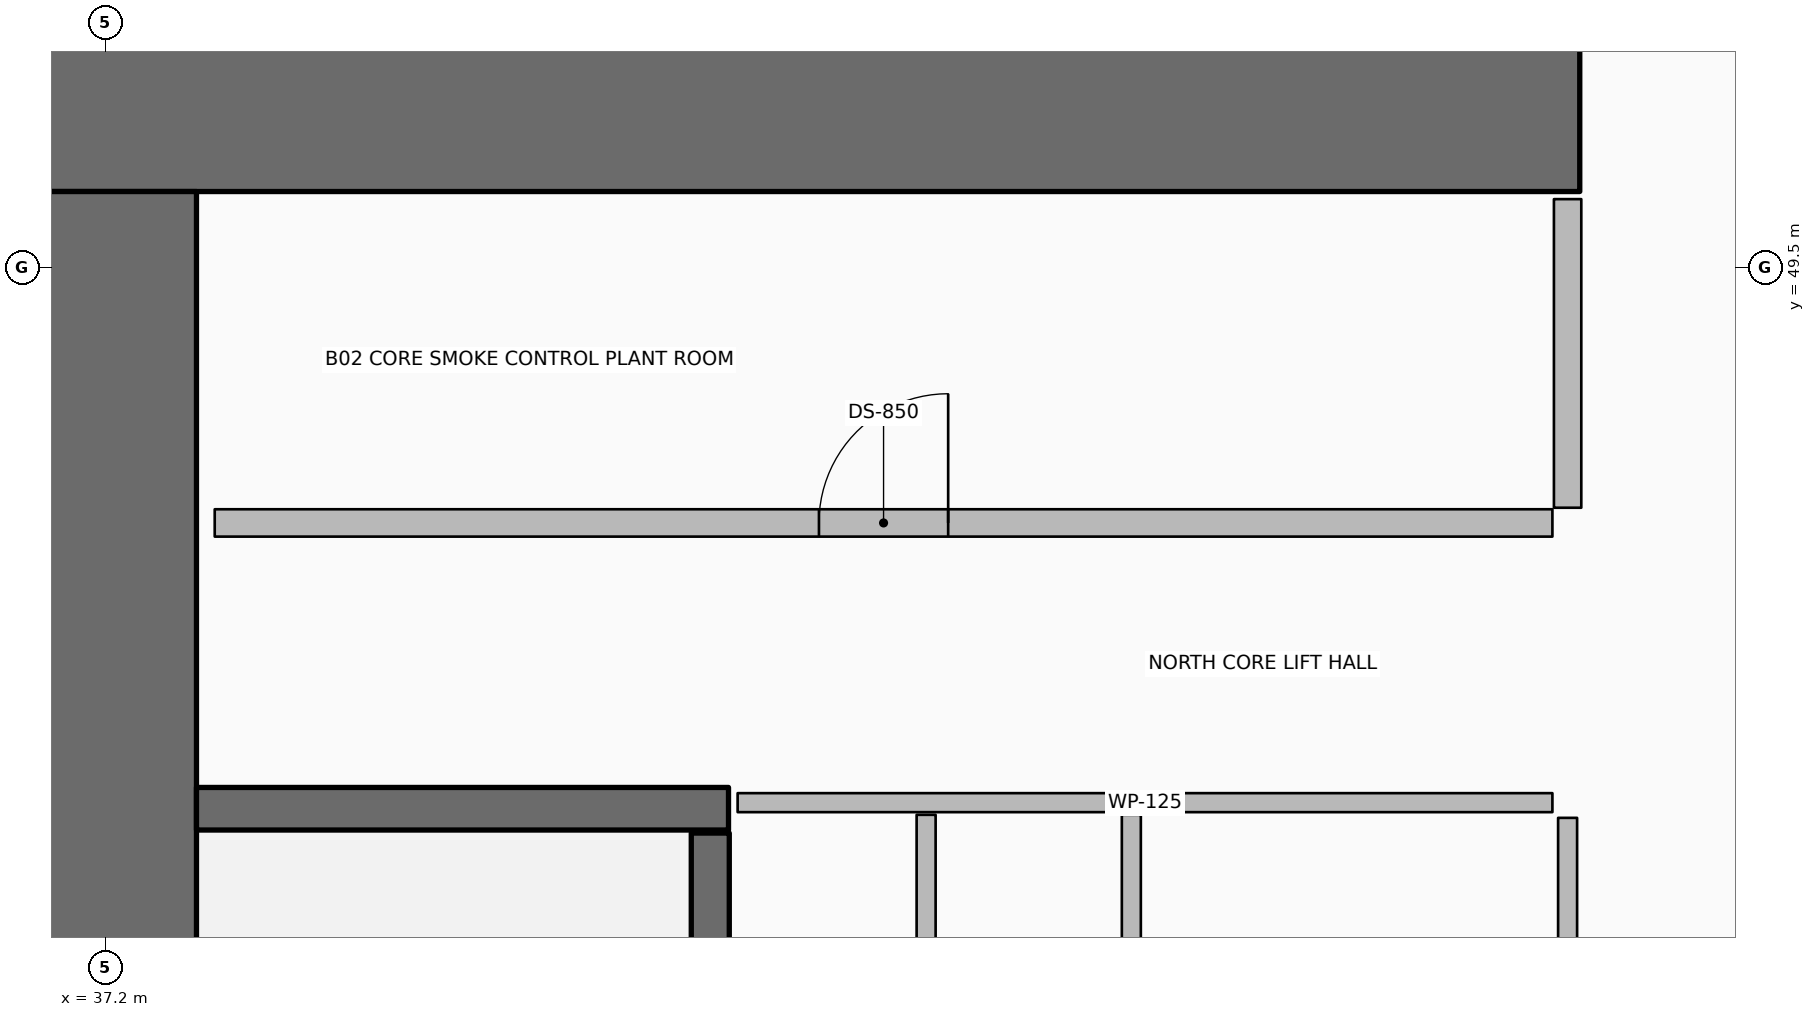
"""IFC4 building model, lengths in metres.
Left out: names, types, materials, properties, quantities, classifications, styles, units other than length and angle.
Written with IfcOpenShell. Run it as: python <this file> out.ifc"""

import sys

from ifc_helpers import new_model, si_unit, direction, frame, frame_2d, origin, place, context, subcontext, project, spatial, rectangle, extrude, element, fill, save


model = new_model("IFC4")
c1 = context("Model", 3, precision=1e-05, world=origin(), true_north=direction((0.0, 1.0)))
c2 = subcontext(c1, "Body", "Model", "MODEL_VIEW")
j1 = project(units=[si_unit("LENGTHUNIT", "METRE"), si_unit("PLANEANGLEUNIT", "RADIAN")], contexts=[c1])
p1 = place(None, origin())
s1 = spatial("IfcSite", under=j1, at=p1, CompositionType="ELEMENT")
p2 = place(p1, origin())
s2 = spatial("IfcBuilding", under=s1, at=p2, CompositionType="ELEMENT")
p3 = place(p2, frame((0.0, 0.0, -7.6)))
s3 = spatial("IfcBuildingStorey", under=s2, at=p3, CompositionType="ELEMENT", Elevation=-7.6)
p4 = place(p3, frame((36.7, 50.55, 0.0), z_axis=(0.0, 0.0, 1.0), x_axis=(1.0, 0.0, 0.0)))
e1 = element("IfcWall", 1, at=p4, inside=s3, PredefinedType="SHEAR", context=c2, shape_type="SweptSolid", body=[
    extrude(rectangle(XDim=10.2, YDim=1.1, at=frame_2d((5.1, 0.0))), origin(), (0.0, 0.0, 1.0), 3.8),
])
p5 = place(p3, frame((37.25, 34.0, 0.0), z_axis=(0.0, 0.0, 1.0), x_axis=(0.0, 1.0, 0.0)))
e2 = element("IfcWall", 2, at=p5, inside=s3, PredefinedType="SHEAR", context=c2, shape_type="SweptSolid", body=[
    extrude(rectangle(XDim=16.0, YDim=1.1, at=frame_2d((8.0, 0.0))), origin(), (0.0, 0.0, 1.0), 3.8),
])
p6 = place(p3, frame((37.8, 45.94, 0.0), z_axis=(0.0, 0.0, 1.0), x_axis=(1.0, 0.0, 0.0)))
e3 = element("IfcWall", 3, at=p6, inside=s3, PredefinedType="SHEAR", context=c2, shape_type="SweptSolid", body=[
    extrude(rectangle(XDim=3.5, YDim=0.28, at=frame_2d((1.75, 0.0))), origin(), (0.0, 0.0, 1.0), 3.8),
])
p7 = place(p3, frame((41.18, 38.22, 0.0), z_axis=(0.0, 0.0, 1.0), x_axis=(0.0, 1.0, 0.0)))
e4 = element("IfcWall", 4, at=p7, inside=s3, PredefinedType="SOLIDWALL", context=c2, shape_type="SweptSolid", body=[
    extrude(rectangle(XDim=7.56, YDim=0.25, at=frame_2d((3.78, 0.0))), origin(), (0.0, 0.0, 1.0), 3.52),
])
p8 = place(p7, frame((0.3, 0.0, 0.0)))
e5 = element("IfcOpeningElement", 5, at=p8, cuts=e4, PredefinedType="OPENING", context=c2, shape_type="SweptSolid", body=[
    extrude(rectangle(XDim=1.55, YDim=2.15, at=frame_2d((0.775, 1.075))), frame((0.0, 0.135, 0.0), z_axis=(0.0, -1.0, 0.0), x_axis=(1.0, 0.0, 0.0)), (0.0, 0.0, 1.0), 0.27),
])
p9 = place(p3, frame((37.92, 47.82, 0.0), z_axis=(0.0, 0.0, 1.0), x_axis=(1.0, 0.0, 0.0)))
e6 = element("IfcWall", 6, at=p9, inside=s3, PredefinedType="PARTITIONING", context=c2, shape_type="SweptSolid", body=[
    extrude(rectangle(XDim=8.8, YDim=0.18, at=frame_2d((4.4, 0.0))), origin(), (0.0, 0.0, 1.0), 3.52),
])
p10 = place(p9, frame((3.975, 0.0, 0.0)))
e7 = element("IfcOpeningElement", 7, at=p10, cuts=e6, PredefinedType="OPENING", context=c2, shape_type="SweptSolid", body=[
    extrude(rectangle(XDim=0.85, YDim=2.06, at=frame_2d((0.425, 1.03))), frame((0.0, 0.1, 0.0), z_axis=(0.0, -1.0, 0.0), x_axis=(1.0, 0.0, 0.0)), (0.0, 0.0, 1.0), 0.2),
])
p11 = place(p3, frame((46.82, 47.92, 0.0), z_axis=(0.0, 0.0, 1.0), x_axis=(0.0, 1.0, 0.0)))
e8 = element("IfcWall", 8, at=p11, inside=s3, PredefinedType="PARTITIONING", context=c2, shape_type="SweptSolid", body=[
    extrude(rectangle(XDim=2.03, YDim=0.18, at=frame_2d((1.015, 0.0))), origin(), (0.0, 0.0, 1.0), 3.52),
])
p12 = place(p3, frame((41.36, 45.98, 0.0), z_axis=(0.0, 0.0, 1.0), x_axis=(1.0, 0.0, 0.0)))
e9 = element("IfcWall", 9, at=p12, inside=s3, PredefinedType="PARTITIONING", context=c2, shape_type="SweptSolid", body=[
    extrude(rectangle(XDim=5.36, YDim=0.125, at=frame_2d((2.68, 0.0))), origin(), (0.0, 0.0, 1.0), 2.96),
])
p13 = place(p3, frame((42.6, 44.35, 0.0), z_axis=(0.0, 0.0, 1.0), x_axis=(0.0, 1.0, 0.0)))
e10 = element("IfcWall", 10, at=p13, inside=s3, PredefinedType="PARTITIONING", context=c2, shape_type="SweptSolid", body=[
    extrude(rectangle(XDim=1.55, YDim=0.125, at=frame_2d((0.775, 0.0))), origin(), (0.0, 0.0, 1.0), 2.96),
])
p14 = place(p3, frame((43.95, 41.58, 0.0), z_axis=(0.0, 0.0, 1.0), x_axis=(0.0, 1.0, 0.0)))
e11 = element("IfcWall", 11, at=p14, inside=s3, PredefinedType="PARTITIONING", context=c2, shape_type="SweptSolid", body=[
    extrude(rectangle(XDim=4.32, YDim=0.125, at=frame_2d((2.16, 0.0))), origin(), (0.0, 0.0, 1.0), 2.96),
])
p15 = place(p3, frame((46.82, 41.58, 0.0), z_axis=(0.0, 0.0, 1.0), x_axis=(0.0, 1.0, 0.0)))
e12 = element("IfcWall", 12, at=p15, inside=s3, PredefinedType="PARTITIONING", context=c2, shape_type="SweptSolid", body=[
    extrude(rectangle(XDim=4.3, YDim=0.125, at=frame_2d((2.15, 0.0))), origin(), (0.0, 0.0, 1.0), 2.96),
])
p16 = place(p15, frame((1.725, 0.0, 0.0)))
e13 = element("IfcOpeningElement", 13, at=p16, cuts=e12, PredefinedType="OPENING", context=c2, shape_type="SweptSolid", body=[
    extrude(rectangle(XDim=0.85, YDim=2.06, at=frame_2d((0.425, 1.03))), frame((0.0, 0.073, 0.0), z_axis=(0.0, -1.0, 0.0), x_axis=(1.0, 0.0, 0.0)), (0.0, 0.0, 1.0), 0.145),
])
p17 = place(p10, origin())
e14 = element("IfcDoor", 14, at=p17, inside=s3, OperationType="SINGLE_SWING_RIGHT", PredefinedType="DOOR", context=c2, shape_type="SweptSolid", body=[
    extrude(rectangle(XDim=0.85, YDim=2.06, at=frame_2d((0.425, 1.03))), frame((0.0, 0.025, 0.0), z_axis=(0.0, -1.0, 0.0), x_axis=(1.0, 0.0, 0.0)), (0.0, 0.0, 1.0), 0.05),
])
fill(e7, e14)
save(model, sys.argv[1])
